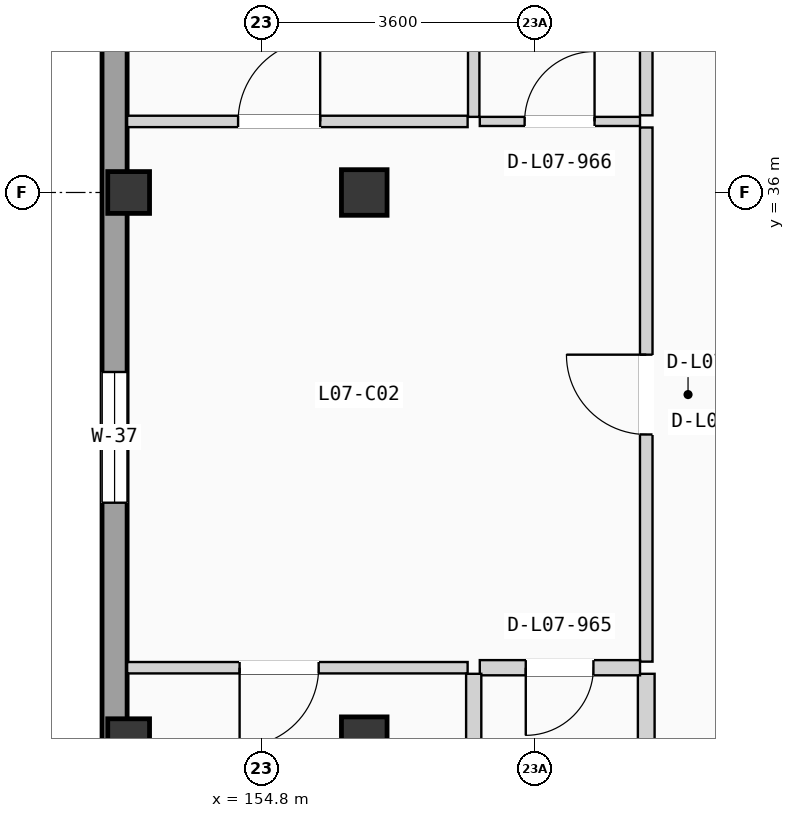
"""IFC4 building model, lengths in metres.
Left out: names, types, materials, properties, quantities, classifications, styles, units other than length and angle.
Written with IfcOpenShell. Run it as: python <this file> out.ifc"""

import sys

from ifc_helpers import new_model, si_unit, direction, frame, frame_2d, origin, origin_2d, place, context, subcontext, project, spatial, rectangle, extrude, element, fill, save


model = new_model("IFC4")
c1 = context("Model", 3, precision=1e-05, world=origin(), true_north=direction((0.0, 1.0)))
c2 = subcontext(c1, "Body", "Model", "MODEL_VIEW")
j1 = project(units=[si_unit("LENGTHUNIT", "METRE"), si_unit("PLANEANGLEUNIT", "RADIAN")], contexts=[c1])
p1 = place(None, origin())
s1 = spatial("IfcSite", under=j1, at=p1, CompositionType="ELEMENT")
p2 = place(p1, origin())
s2 = spatial("IfcBuilding", under=s1, at=p2, CompositionType="ELEMENT")
p3 = place(p2, frame((0.0, 0.0, 24.675)))
s3 = spatial("IfcBuildingStorey", under=s2, at=p3, CompositionType="ELEMENT", Elevation=24.675)
for number, where, z_axis, x_axis in (
    (1, (153.05, 28.8, 0.0), (0.0, 0.0, 1.0), (1.0, 0.0, 0.0)),
    (2, (153.05, 36.0, 0.0), (0.0, 0.0, 1.0), (1.0, 0.0, 0.0)),
):
    element("IfcColumn", number, at=place(p3, frame(where, z_axis=z_axis, x_axis=x_axis)), inside=s3, PredefinedType="COLUMN", context=c2, shape_type="SweptSolid", body=[
        extrude(rectangle(XDim=0.55, YDim=0.55, at=origin_2d()), origin(), (0.0, 0.0, 1.0), 3.15),
    ])
for number, where, z_axis, x_axis in (
    (3, (156.15, 28.8, 0.0), (0.0, 0.0, 1.0), (1.0, 0.0, 0.0)),
    (4, (156.15, 36.0, 0.0), (0.0, 0.0, 1.0), (1.0, 0.0, 0.0)),
):
    element("IfcColumn", number, at=place(p3, frame(where, z_axis=z_axis, x_axis=x_axis)), inside=s3, PredefinedType="COLUMN", context=c2, shape_type="SweptSolid", body=[
        extrude(rectangle(XDim=0.6, YDim=0.6, at=origin_2d()), origin(), (0.0, 0.0, 1.0), 3.15),
    ])
p4 = place(p3, frame((152.865, 0.33, 0.0), z_axis=(0.0, 0.0, 1.0), x_axis=(0.0, 1.0, 0.0)))
e5 = element("IfcWall", 5, at=p4, inside=s3, PredefinedType="SOLIDWALL", context=c2, shape_type="SweptSolid", body=[
    extrude(rectangle(XDim=49.74, YDim=0.33, at=frame_2d((24.87, 0.0))), origin(), (0.0, 0.0, 1.0), 2.9),
])
p5 = place(p4, frame((15.52, 0.0, 0.565)))
e6 = element("IfcOpeningElement", 6, at=p5, cuts=e5, PredefinedType="OPENING", context=c2, shape_type="SweptSolid", body=[
    extrude(rectangle(XDim=1.6, YDim=1.65, at=frame_2d((0.8, 0.825))), frame((0.0, 0.175, 0.0), z_axis=(0.0, -1.0, 0.0), x_axis=(1.0, 0.0, 0.0)), (0.0, 0.0, 1.0), 0.35),
])
p6 = place(p4, frame((9.251, 0.0, 0.85)))
e7 = element("IfcOpeningElement", 7, at=p6, cuts=e5, PredefinedType="OPENING", context=c2, shape_type="SweptSolid", body=[
    extrude(rectangle(XDim=0.95, YDim=1.2, at=frame_2d((0.475, 0.6))), frame((0.0, 0.175, 0.0), z_axis=(0.0, -1.0, 0.0), x_axis=(1.0, 0.0, 0.0)), (0.0, 0.0, 1.0), 0.35),
])
p7 = place(p4, frame((18.87, 0.0, 0.9)))
e8 = element("IfcOpeningElement", 8, at=p7, cuts=e5, PredefinedType="OPENING", context=c2, shape_type="SweptSolid", body=[
    extrude(rectangle(XDim=1.72, YDim=1.2, at=frame_2d((0.86, 0.6))), frame((0.0, 0.175, 0.0), z_axis=(0.0, -1.0, 0.0), x_axis=(1.0, 0.0, 0.0)), (0.0, 0.0, 1.0), 0.35),
])
p8 = place(p4, frame((31.588, 0.0, 0.865)))
e9 = element("IfcOpeningElement", 9, at=p8, cuts=e5, PredefinedType="OPENING", context=c2, shape_type="SweptSolid", body=[
    extrude(rectangle(XDim=1.72, YDim=1.35, at=frame_2d((0.86, 0.675))), frame((0.0, 0.175, 0.0), z_axis=(0.0, -1.0, 0.0), x_axis=(1.0, 0.0, 0.0)), (0.0, 0.0, 1.0), 0.35),
])
p9 = place(p4, frame((25.016, 0.0, 0.715)))
e10 = element("IfcOpeningElement", 10, at=p9, cuts=e5, PredefinedType="OPENING", context=c2, shape_type="SweptSolid", body=[
    extrude(rectangle(XDim=1.72, YDim=1.5, at=frame_2d((0.86, 0.75))), frame((0.0, 0.175, 0.0), z_axis=(0.0, -1.0, 0.0), x_axis=(1.0, 0.0, 0.0)), (0.0, 0.0, 1.0), 0.35),
])
p10 = place(p4, frame((38.718, 0.0, 0.565)))
e11 = element("IfcOpeningElement", 11, at=p10, cuts=e5, PredefinedType="OPENING", context=c2, shape_type="SweptSolid", body=[
    extrude(rectangle(XDim=1.72, YDim=1.65, at=frame_2d((0.86, 0.825))), frame((0.0, 0.175, 0.0), z_axis=(0.0, -1.0, 0.0), x_axis=(1.0, 0.0, 0.0)), (0.0, 0.0, 1.0), 0.35),
])
p11 = place(p3, frame((159.86, 29.827, 0.0), z_axis=(0.0, 0.0, 1.0), x_axis=(0.0, 1.0, 0.0)))
e12 = element("IfcWall", 12, at=p11, inside=s3, PredefinedType="PARTITIONING", context=c2, shape_type="SweptSolid", body=[
    extrude(rectangle(XDim=7.028, YDim=0.165, at=frame_2d((3.514, 0.0))), origin(), (0.0, 0.0, 1.0), 2.87),
])
p12 = place(p11, frame((2.989, 0.0, 0.0)))
e13 = element("IfcOpeningElement", 13, at=p12, cuts=e12, PredefinedType="OPENING", context=c2, shape_type="SweptSolid", body=[
    extrude(rectangle(XDim=1.05, YDim=2.13, at=frame_2d((0.525, 1.065))), frame((0.0, 0.093, 0.0), z_axis=(0.0, -1.0, 0.0), x_axis=(1.0, 0.0, 0.0)), (0.0, 0.0, 1.0), 0.185),
])
p13 = place(p3, frame((159.86, 23.882, 0.0), z_axis=(0.0, 0.0, 1.0), x_axis=(0.0, 1.0, 0.0)))
e14 = element("IfcWall", 14, at=p13, inside=s3, PredefinedType="PLUMBINGWALL", context=c2, shape_type="SweptSolid", body=[
    extrude(rectangle(XDim=5.785, YDim=0.22, at=frame_2d((2.893, 0.0))), origin(), (0.0, 0.0, 1.0), 2.87),
])
p14 = place(p3, frame((159.86, 37.015, 0.0), z_axis=(0.0, 0.0, 1.0), x_axis=(0.0, 1.0, 0.0)))
e15 = element("IfcWall", 15, at=p14, inside=s3, PredefinedType="PARTITIONING", context=c2, shape_type="SweptSolid", body=[
    extrude(rectangle(XDim=5.785, YDim=0.165, at=frame_2d((2.893, 0.0))), origin(), (0.0, 0.0, 1.0), 2.87),
])
p15 = place(p3, frame((157.67, 29.747, 0.0), z_axis=(0.0, 0.0, 1.0), x_axis=(1.0, 0.0, 0.0)))
e16 = element("IfcWall", 16, at=p15, inside=s3, PredefinedType="PLUMBINGWALL", context=c2, shape_type="SweptSolid", body=[
    extrude(rectangle(XDim=2.108, YDim=0.2, at=frame_2d((1.054, 0.0))), origin(), (0.0, 0.0, 1.0), 2.87),
])
p16 = place(p15, frame((0.605, 0.0, 0.0)))
e17 = element("IfcOpeningElement", 17, at=p16, cuts=e16, PredefinedType="OPENING", context=c2, shape_type="SweptSolid", body=[
    extrude(rectangle(XDim=0.89, YDim=2.03, at=frame_2d((0.445, 1.015))), frame((0.0, 0.11, 0.0), z_axis=(0.0, -1.0, 0.0), x_axis=(1.0, 0.0, 0.0)), (0.0, 0.0, 1.0), 0.22),
])
p17 = place(p3, frame((157.67, 36.935, 0.0), z_axis=(0.0, 0.0, 1.0), x_axis=(1.0, 0.0, 0.0)))
e18 = element("IfcWall", 18, at=p17, inside=s3, PredefinedType="PARTITIONING", context=c2, shape_type="SweptSolid", body=[
    extrude(rectangle(XDim=2.108, YDim=0.12, at=frame_2d((1.054, 0.0))), origin(), (0.0, 0.0, 1.0), 2.87),
])
p18 = place(p17, frame((0.59, 0.0, 0.0)))
e19 = element("IfcOpeningElement", 19, at=p18, cuts=e18, PredefinedType="OPENING", context=c2, shape_type="SweptSolid", body=[
    extrude(rectangle(XDim=0.92, YDim=2.02, at=frame_2d((0.46, 1.01))), frame((0.0, 0.07, 0.0), z_axis=(0.0, -1.0, 0.0), x_axis=(1.0, 0.0, 0.0)), (0.0, 0.0, 1.0), 0.14),
])
p19 = place(p3, frame((153.03, 29.747, 0.0), z_axis=(0.0, 0.0, 1.0), x_axis=(1.0, 0.0, 0.0)))
e20 = element("IfcWall", 20, at=p19, inside=s3, PredefinedType="PARTITIONING", context=c2, shape_type="SweptSolid", body=[
    extrude(rectangle(XDim=4.48, YDim=0.15, at=frame_2d((2.24, 0.0))), origin(), (0.0, 0.0, 1.0), 2.87),
])
p20 = place(p19, frame((1.48, 0.0, 0.0)))
e21 = element("IfcOpeningElement", 21, at=p20, cuts=e20, PredefinedType="OPENING", context=c2, shape_type="SweptSolid", body=[
    extrude(rectangle(XDim=1.04, YDim=2.08, at=frame_2d((0.52, 1.04))), frame((0.0, 0.085, 0.0), z_axis=(0.0, -1.0, 0.0), x_axis=(1.0, 0.0, 0.0)), (0.0, 0.0, 1.0), 0.17),
])
p21 = place(p3, frame((153.03, 36.935, 0.0), z_axis=(0.0, 0.0, 1.0), x_axis=(1.0, 0.0, 0.0)))
e22 = element("IfcWall", 22, at=p21, inside=s3, PredefinedType="PARTITIONING", context=c2, shape_type="SweptSolid", body=[
    extrude(rectangle(XDim=4.48, YDim=0.15, at=frame_2d((2.24, 0.0))), origin(), (0.0, 0.0, 1.0), 2.87),
])
p22 = place(p21, frame((1.46, 0.0, 0.0)))
e23 = element("IfcOpeningElement", 23, at=p22, cuts=e22, PredefinedType="OPENING", context=c2, shape_type="SweptSolid", body=[
    extrude(rectangle(XDim=1.08, YDim=2.1, at=frame_2d((0.54, 1.05))), frame((0.0, 0.085, 0.0), z_axis=(0.0, -1.0, 0.0), x_axis=(1.0, 0.0, 0.0)), (0.0, 0.0, 1.0), 0.17),
])
p23 = place(p3, frame((157.59, 23.882, 0.0), z_axis=(0.0, 0.0, 1.0), x_axis=(0.0, 1.0, 0.0)))
e24 = element("IfcWall", 24, at=p23, inside=s3, PredefinedType="PLUMBINGWALL", context=c2, shape_type="SweptSolid", body=[
    extrude(rectangle(XDim=5.785, YDim=0.2, at=frame_2d((2.893, 0.0))), origin(), (0.0, 0.0, 1.0), 2.87),
])
p24 = place(p3, frame((157.59, 36.995, 0.0), z_axis=(0.0, 0.0, 1.0), x_axis=(0.0, 1.0, 0.0)))
e25 = element("IfcWall", 25, at=p24, inside=s3, PredefinedType="PARTITIONING", context=c2, shape_type="SweptSolid", body=[
    extrude(rectangle(XDim=5.805, YDim=0.15, at=frame_2d((2.902, 0.0))), origin(), (0.0, 0.0, 1.0), 2.87),
])
p25 = place(p8, origin())
e26 = element("IfcWindow", 26, at=p25, inside=s3, PartitioningType="DOUBLE_PANEL_VERTICAL", PredefinedType="WINDOW", context=c2, shape_type="SweptSolid", body=[
    extrude(rectangle(XDim=1.72, YDim=1.35, at=frame_2d((0.86, 0.675))), frame((0.0, 0.03, 0.0), z_axis=(0.0, -1.0, 0.0), x_axis=(1.0, 0.0, 0.0)), (0.0, 0.0, 1.0), 0.06),
])
fill(e9, e26)
p26 = place(p12, origin())
e27 = element("IfcDoor", 27, at=p26, inside=s3, OperationType="SINGLE_SWING_RIGHT", PredefinedType="DOOR", context=c2, shape_type="SweptSolid", body=[
    extrude(rectangle(XDim=1.05, YDim=2.13, at=frame_2d((0.525, 1.065))), frame((0.0, 0.025, 0.0), z_axis=(0.0, -1.0, 0.0), x_axis=(1.0, 0.0, 0.0)), (0.0, 0.0, 1.0), 0.05),
])
fill(e13, e27)
p27 = place(p16, frame((0.89, 0.0, 0.0), z_axis=(0.0, 0.0, 1.0), x_axis=(-1.0, 0.0, 0.0)))
e28 = element("IfcDoor", 28, at=p27, inside=s3, OperationType="SINGLE_SWING_LEFT", PredefinedType="DOOR", context=c2, shape_type="SweptSolid", body=[
    extrude(rectangle(XDim=0.89, YDim=2.03, at=frame_2d((0.445, 1.015))), frame((0.0, 0.025, 0.0), z_axis=(0.0, -1.0, 0.0), x_axis=(1.0, 0.0, 0.0)), (0.0, 0.0, 1.0), 0.05),
])
fill(e17, e28)
p28 = place(p18, origin())
e29 = element("IfcDoor", 29, at=p28, inside=s3, OperationType="SINGLE_SWING_RIGHT", PredefinedType="DOOR", context=c2, shape_type="SweptSolid", body=[
    extrude(rectangle(XDim=0.92, YDim=2.02, at=frame_2d((0.46, 1.01))), frame((0.0, 0.025, 0.0), z_axis=(0.0, -1.0, 0.0), x_axis=(1.0, 0.0, 0.0)), (0.0, 0.0, 1.0), 0.05),
])
fill(e19, e29)
p29 = place(p20, frame((1.04, 0.0, 0.0), z_axis=(0.0, 0.0, 1.0), x_axis=(-1.0, 0.0, 0.0)))
e30 = element("IfcDoor", 30, at=p29, inside=s3, OperationType="SINGLE_SWING_LEFT", PredefinedType="DOOR", context=c2, shape_type="SweptSolid", body=[
    extrude(rectangle(XDim=1.04, YDim=2.08, at=frame_2d((0.52, 1.04))), frame((0.0, 0.025, 0.0), z_axis=(0.0, -1.0, 0.0), x_axis=(1.0, 0.0, 0.0)), (0.0, 0.0, 1.0), 0.05),
])
fill(e21, e30)
p30 = place(p22, origin())
e31 = element("IfcDoor", 31, at=p30, inside=s3, OperationType="SINGLE_SWING_RIGHT", PredefinedType="DOOR", context=c2, shape_type="SweptSolid", body=[
    extrude(rectangle(XDim=1.08, YDim=2.1, at=frame_2d((0.54, 1.05))), frame((0.0, 0.025, 0.0), z_axis=(0.0, -1.0, 0.0), x_axis=(1.0, 0.0, 0.0)), (0.0, 0.0, 1.0), 0.05),
])
fill(e23, e31)
save(model, sys.argv[1])
